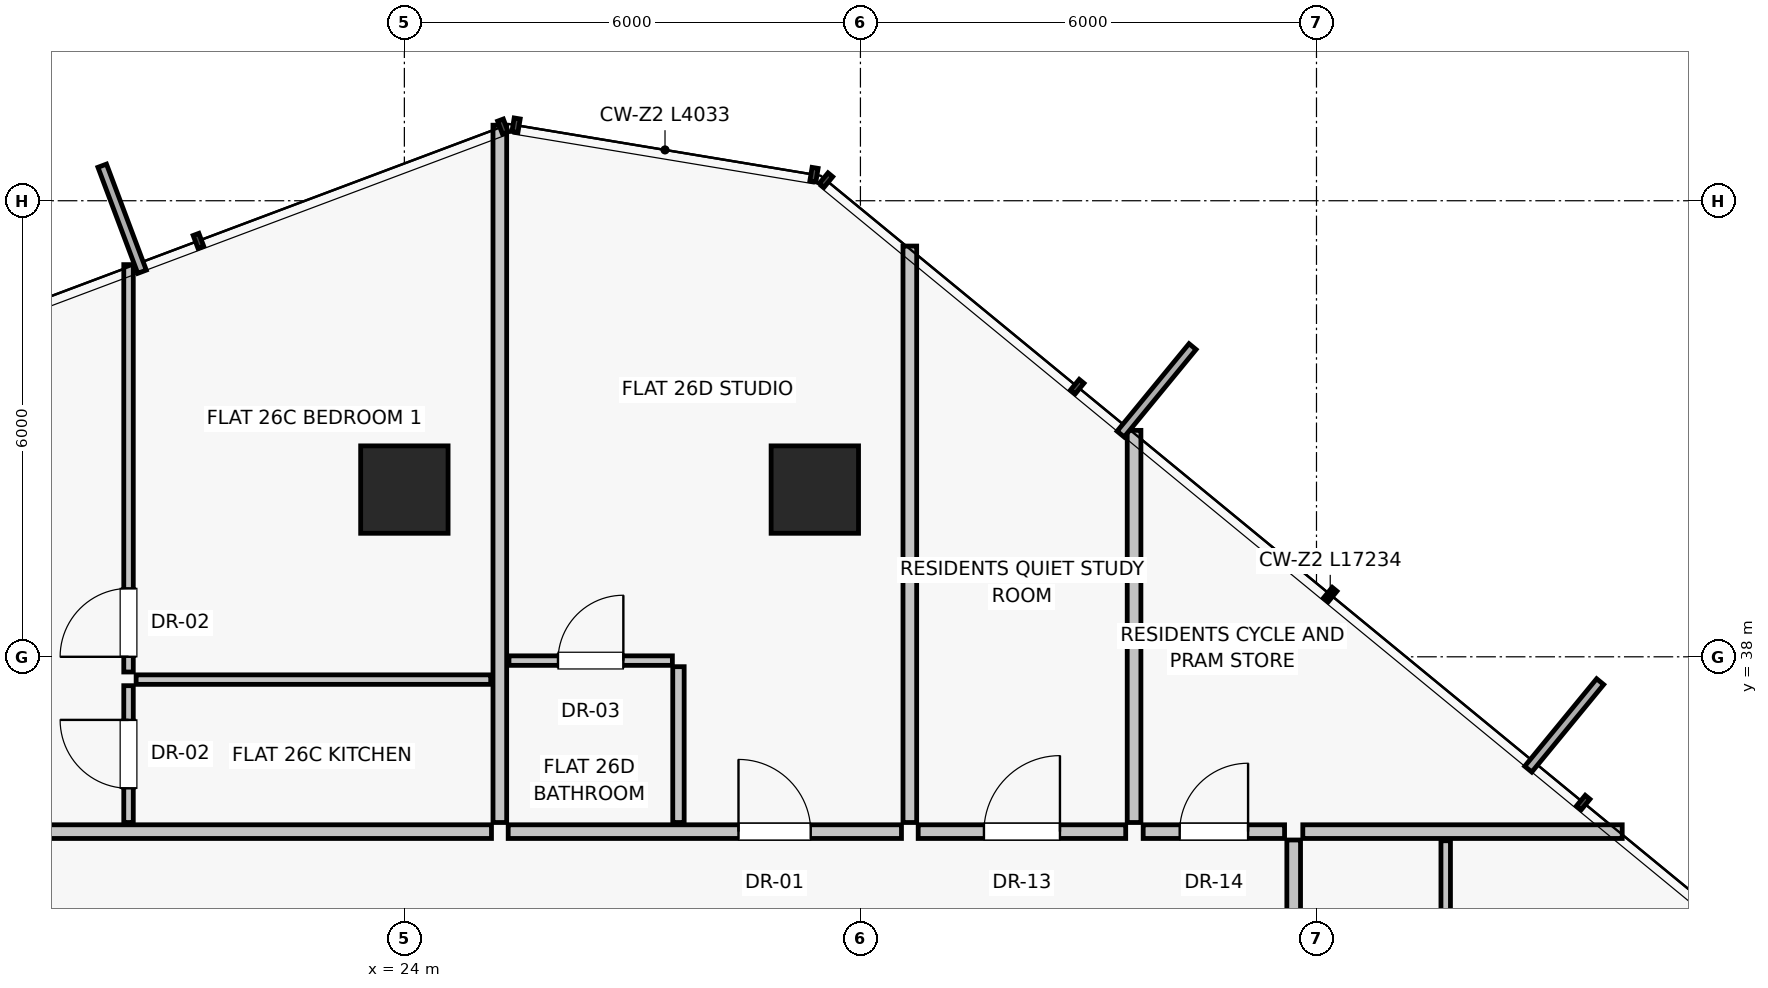
"""IFC4 building model, lengths in metres.
Left out: names, types, materials, properties, quantities, classifications, styles, units other than length and angle.
Written with IfcOpenShell. Run it as: python <this file> out.ifc"""

import sys

from ifc_helpers import new_model, si_unit, direction, frame, frame_2d, origin, origin_2d, place, context, subcontext, project, spatial, rectangle, extrude, source, transform, mapped, element, fill, save


model = new_model("IFC4")
c1 = context("Model", 3, precision=1e-05, world=origin(), true_north=direction((0.0, 1.0)))
c2 = subcontext(c1, "Body", "Model", "MODEL_VIEW")
j1 = project(units=[si_unit("LENGTHUNIT", "METRE"), si_unit("PLANEANGLEUNIT", "RADIAN")], contexts=[c1])
p1 = place(None, origin())
s1 = spatial("IfcSite", under=j1, at=p1, CompositionType="ELEMENT")
p2 = place(p1, origin())
s2 = spatial("IfcBuilding", under=s1, at=p2, CompositionType="ELEMENT")
p3 = place(p2, frame((0.0, 0.0, 95.95)))
s3 = spatial("IfcBuildingStorey", under=s2, at=p3, CompositionType="ELEMENT", Elevation=95.95)
for number, where, z_axis, x_axis in (
    (1, (29.4, 40.2, 0.0), (0.0, 0.0, 1.0), (1.0, 0.0, 0.0)),
    (2, (24.0, 40.2, 0.0), (0.0, 0.0, 1.0), (1.0, 0.0, 0.0)),
):
    element("IfcColumn", number, at=place(p3, frame(where, z_axis=z_axis, x_axis=x_axis)), inside=s3, PredefinedType="COLUMN", context=c2, shape_type="SweptSolid", body=[
        extrude(rectangle(XDim=1.15, YDim=1.15, at=origin_2d()), origin(), (0.0, 0.0, 1.0), 3.25),
    ])
p4 = place(p3, frame((33.6, 35.82, 0.0), z_axis=(0.0, 0.0, 1.0), x_axis=(0.0, 1.0, 0.0)))
e3 = element("IfcWall", 3, at=p4, inside=s3, PredefinedType="PARTITIONING", context=c2, shape_type="SweptSolid", body=[
    extrude(rectangle(XDim=5.159, YDim=0.18, at=frame_2d((2.58, 0.0))), origin(), (0.0, 0.0, 1.0), 3.0),
])
p5 = place(p3, frame((14.51, 35.7, 0.0), z_axis=(0.0, 0.0, 1.0), x_axis=(1.0, 0.0, 0.0)))
e4 = element("IfcWall", 4, at=p5, inside=s3, PredefinedType="PARTITIONING", context=c2, shape_type="SweptSolid", body=[
    extrude(rectangle(XDim=10.636, YDim=0.18, at=frame_2d((5.318, 0.0))), origin(), (0.0, 0.0, 1.0), 2.58),
])
p6 = place(p5, frame((3.525, 0.0, 0.0)))
e5 = element("IfcOpeningElement", 5, at=p6, cuts=e4, PredefinedType="OPENING", context=c2, shape_type="SweptSolid", body=[
    extrude(rectangle(XDim=0.95, YDim=2.02, at=frame_2d((0.475, 1.01))), frame((0.0, 0.1, 0.0), z_axis=(0.0, -1.0, 0.0), x_axis=(1.0, 0.0, 0.0)), (0.0, 0.0, 1.0), 0.2),
])
p7 = place(p3, frame((20.371, 35.82, 0.0), z_axis=(0.0, 0.0, 1.0), x_axis=(0.0, 1.0, 0.0)))
e6 = element("IfcWall", 6, at=p7, inside=s3, PredefinedType="PARTITIONING", context=c2, shape_type="SweptSolid", body=[
    extrude(rectangle(XDim=1.8, YDim=0.125, at=frame_2d((0.9, 0.0))), origin(), (0.0, 0.0, 1.0), 3.0),
])
p8 = place(p7, frame((0.45, 0.0, 0.0)))
e7 = element("IfcOpeningElement", 7, at=p8, cuts=e6, PredefinedType="OPENING", context=c2, shape_type="SweptSolid", body=[
    extrude(rectangle(XDim=0.9, YDim=2.01, at=frame_2d((0.45, 1.005))), frame((0.0, 0.073, 0.0), z_axis=(0.0, -1.0, 0.0), x_axis=(1.0, 0.0, 0.0)), (0.0, 0.0, 1.0), 0.145),
])
p9 = place(p3, frame((20.471, 37.7, 0.0), z_axis=(0.0, 0.0, 1.0), x_axis=(1.0, 0.0, 0.0)))
e8 = element("IfcWall", 8, at=p9, inside=s3, PredefinedType="PARTITIONING", context=c2, shape_type="SweptSolid", body=[
    extrude(rectangle(XDim=4.665, YDim=0.125, at=frame_2d((2.333, 0.0))), origin(), (0.0, 0.0, 1.0), 3.0),
])
p10 = place(p3, frame((20.371, 37.8, 0.0), z_axis=(0.0, 0.0, 1.0), x_axis=(0.0, 1.0, 0.0)))
e9 = element("IfcWall", 9, at=p10, inside=s3, PredefinedType="PARTITIONING", context=c2, shape_type="SweptSolid", body=[
    extrude(rectangle(XDim=5.359, YDim=0.125, at=frame_2d((2.68, 0.0))), origin(), (0.0, 0.0, 1.0), 3.0),
])
p11 = place(p10, frame((0.2, 0.0, 0.0)))
e10 = element("IfcOpeningElement", 10, at=p11, cuts=e9, PredefinedType="OPENING", context=c2, shape_type="SweptSolid", body=[
    extrude(rectangle(XDim=0.9, YDim=2.01, at=frame_2d((0.45, 1.005))), frame((0.0, 0.073, 0.0), z_axis=(0.0, -1.0, 0.0), x_axis=(1.0, 0.0, 0.0)), (0.0, 0.0, 1.0), 0.145),
])
p12 = place(p3, frame((25.256, 35.82, 0.0), z_axis=(0.0, 0.0, 1.0), x_axis=(0.0, 1.0, 0.0)))
e11 = element("IfcWall", 11, at=p12, inside=s3, PredefinedType="PARTITIONING", context=c2, shape_type="SweptSolid", body=[
    extrude(rectangle(XDim=9.174, YDim=0.18, at=frame_2d((4.587, 0.0))), origin(), (0.0, 0.0, 1.0), 3.0),
])
p13 = place(p3, frame((30.76, 35.7, 0.0), z_axis=(0.0, 0.0, 1.0), x_axis=(1.0, 0.0, 0.0)))
e12 = element("IfcWall", 12, at=p13, inside=s3, PredefinedType="PARTITIONING", context=c2, shape_type="SweptSolid", body=[
    extrude(rectangle(XDim=2.73, YDim=0.18, at=frame_2d((1.365, 0.0))), origin(), (0.0, 0.0, 1.0), 3.0),
])
p14 = place(p13, frame((0.865, 0.0, 0.0)))
e13 = element("IfcOpeningElement", 13, at=p14, cuts=e12, PredefinedType="OPENING", context=c2, shape_type="SweptSolid", body=[
    extrude(rectangle(XDim=1.0, YDim=2.01, at=frame_2d((0.5, 1.005))), frame((0.0, 0.1, 0.0), z_axis=(0.0, -1.0, 0.0), x_axis=(1.0, 0.0, 0.0)), (0.0, 0.0, 1.0), 0.2),
])
p15 = place(p3, frame((30.65, 35.82, 0.0), z_axis=(0.0, 0.0, 1.0), x_axis=(0.0, 1.0, 0.0)))
e14 = element("IfcWall", 14, at=p15, inside=s3, PredefinedType="PARTITIONING", context=c2, shape_type="SweptSolid", body=[
    extrude(rectangle(XDim=7.584, YDim=0.18, at=frame_2d((3.792, 0.0))), origin(), (0.0, 0.0, 1.0), 3.0),
])
p16 = place(p3, frame((25.366, 35.7, 0.0), z_axis=(0.0, 0.0, 1.0), x_axis=(1.0, 0.0, 0.0)))
e15 = element("IfcWall", 15, at=p16, inside=s3, PredefinedType="PARTITIONING", context=c2, shape_type="SweptSolid", body=[
    extrude(rectangle(XDim=5.174, YDim=0.18, at=frame_2d((2.587, 0.0))), origin(), (0.0, 0.0, 1.0), 2.58),
])
p17 = place(p16, frame((3.03, 0.0, 0.0)))
e16 = element("IfcOpeningElement", 16, at=p17, cuts=e15, PredefinedType="OPENING", context=c2, shape_type="SweptSolid", body=[
    extrude(rectangle(XDim=0.95, YDim=2.02, at=frame_2d((0.475, 1.01))), frame((0.0, 0.1, 0.0), z_axis=(0.0, -1.0, 0.0), x_axis=(1.0, 0.0, 0.0)), (0.0, 0.0, 1.0), 0.2),
])
p18 = place(p3, frame((27.606, 35.82, 0.0), z_axis=(0.0, 0.0, 1.0), x_axis=(0.0, 1.0, 0.0)))
e17 = element("IfcWall", 17, at=p18, inside=s3, PredefinedType="PARTITIONING", context=c2, shape_type="SweptSolid", body=[
    extrude(rectangle(XDim=2.05, YDim=0.15, at=frame_2d((1.025, 0.0))), origin(), (0.0, 0.0, 1.0), 3.0),
])
p19 = place(p3, frame((25.376, 37.95, 0.0), z_axis=(0.0, 0.0, 1.0), x_axis=(1.0, 0.0, 0.0)))
e18 = element("IfcWall", 18, at=p19, inside=s3, PredefinedType="PARTITIONING", context=c2, shape_type="SweptSolid", body=[
    extrude(rectangle(XDim=2.15, YDim=0.125, at=frame_2d((1.075, 0.0))), origin(), (0.0, 0.0, 1.0), 3.0),
])
p20 = place(p19, frame((0.645, 0.0, 0.0)))
e19 = element("IfcOpeningElement", 19, at=p20, cuts=e18, PredefinedType="OPENING", context=c2, shape_type="SweptSolid", body=[
    extrude(rectangle(XDim=0.86, YDim=2.01, at=frame_2d((0.43, 1.005))), frame((0.0, 0.073, 0.0), z_axis=(0.0, -1.0, 0.0), x_axis=(1.0, 0.0, 0.0)), (0.0, 0.0, 1.0), 0.145),
])
p21 = place(p3, frame((35.82, 35.7, 0.0), z_axis=(0.0, 0.0, 1.0), x_axis=(1.0, 0.0, 0.0)))
e20 = element("IfcWall", 20, at=p21, inside=s3, PredefinedType="PARTITIONING", context=c2, shape_type="SweptSolid", body=[
    extrude(rectangle(XDim=4.202, YDim=0.18, at=frame_2d((2.101, 0.0))), origin(), (0.0, 0.0, 1.0), 3.0),
])
p22 = place(p3, frame((35.7, 18.71, 0.0), z_axis=(0.0, 0.0, 1.0), x_axis=(0.0, 1.0, 0.0)))
e21 = element("IfcWall", 21, at=p22, inside=s3, PredefinedType="PARTITIONING", context=c2, shape_type="SweptSolid", body=[
    extrude(rectangle(XDim=16.88, YDim=0.18, at=frame_2d((8.44, 0.0))), origin(), (0.0, 0.0, 1.0), 2.58),
])
p23 = place(p22, frame((5.94, 0.0, 0.0)))
e22 = element("IfcOpeningElement", 22, at=p23, cuts=e21, PredefinedType="OPENING", context=c2, shape_type="SweptSolid", body=[
    extrude(rectangle(XDim=0.95, YDim=2.02, at=frame_2d((0.475, 1.01))), frame((0.0, 0.1, 0.0), z_axis=(0.0, -1.0, 0.0), x_axis=(1.0, 0.0, 0.0)), (0.0, 0.0, 1.0), 0.2),
])
p24 = place(p3, frame((37.7, 29.5, 0.0), z_axis=(0.0, 0.0, 1.0), x_axis=(0.0, 1.0, 0.0)))
e23 = element("IfcWall", 23, at=p24, inside=s3, PredefinedType="PARTITIONING", context=c2, shape_type="SweptSolid", body=[
    extrude(rectangle(XDim=6.08, YDim=0.125, at=frame_2d((3.04, 0.0))), origin(), (0.0, 0.0, 1.0), 3.0),
])
p25 = place(p3, frame((33.72, 35.7, 0.0), z_axis=(0.0, 0.0, 1.0), x_axis=(1.0, 0.0, 0.0)))
e24 = element("IfcWall", 24, at=p25, inside=s3, PredefinedType="PARTITIONING", context=c2, shape_type="SweptSolid", body=[
    extrude(rectangle(XDim=1.86, YDim=0.18, at=frame_2d((0.93, 0.0))), origin(), (0.0, 0.0, 1.0), 3.0),
])
p26 = place(p25, frame((0.48, 0.0, 0.0)))
e25 = element("IfcOpeningElement", 25, at=p26, cuts=e24, PredefinedType="OPENING", context=c2, shape_type="SweptSolid", body=[
    extrude(rectangle(XDim=0.9, YDim=2.01, at=frame_2d((0.45, 1.005))), frame((0.0, 0.1, 0.0), z_axis=(0.0, -1.0, 0.0), x_axis=(1.0, 0.0, 0.0)), (0.0, 0.0, 1.0), 0.2),
])
m1 = source(origin(), c2, "Body", "SweptSolid", [
    extrude(rectangle(XDim=0.9, YDim=2.01, at=frame_2d((0.45, 1.005))), frame((0.0, 0.025, 0.0), z_axis=(0.0, -1.0, 0.0), x_axis=(1.0, 0.0, 0.0)), (0.0, 0.0, 1.0), 0.05),
])
p27 = place(p8, origin())
e26 = element("IfcDoor", 26, at=p27, inside=s3, OperationType="SINGLE_SWING_RIGHT", PredefinedType="DOOR", context=c2, shape_type="MappedRepresentation", body=[
    mapped(m1, transform((0.0, 0.0, 0.0), scale=1.0)),
])
fill(e7, e26)
p28 = place(p11, origin())
e27 = element("IfcDoor", 27, at=p28, inside=s3, OperationType="SINGLE_SWING_LEFT", PredefinedType="DOOR", context=c2, shape_type="MappedRepresentation", body=[
    mapped(m1, transform((0.0, 0.0, 0.0), scale=1.0)),
])
fill(e10, e27)
m2 = source(origin(), c2, "Body", "SweptSolid", [
    extrude(rectangle(XDim=1.0, YDim=2.01, at=frame_2d((0.5, 1.005))), frame((0.0, 0.025, 0.0), z_axis=(0.0, -1.0, 0.0), x_axis=(1.0, 0.0, 0.0)), (0.0, 0.0, 1.0), 0.05),
])
p29 = place(p14, origin())
e28 = element("IfcDoor", 28, at=p29, inside=s3, OperationType="SINGLE_SWING_RIGHT", PredefinedType="DOOR", context=c2, shape_type="MappedRepresentation", body=[
    mapped(m2, transform((0.0, 0.0, 0.0), scale=1.0)),
])
fill(e13, e28)
m3 = source(origin(), c2, "Body", "SweptSolid", [
    extrude(rectangle(XDim=0.95, YDim=2.02, at=frame_2d((0.475, 1.01))), frame((0.0, 0.025, 0.0), z_axis=(0.0, -1.0, 0.0), x_axis=(1.0, 0.0, 0.0)), (0.0, 0.0, 1.0), 0.05),
])
p30 = place(p17, origin())
e29 = element("IfcDoor", 29, at=p30, inside=s3, OperationType="SINGLE_SWING_LEFT", PredefinedType="DOOR", context=c2, shape_type="MappedRepresentation", body=[
    mapped(m3, transform((0.0, 0.0, 0.0), scale=1.0)),
])
fill(e16, e29)
m4 = source(origin(), c2, "Body", "SweptSolid", [
    extrude(rectangle(XDim=0.86, YDim=2.01, at=frame_2d((0.43, 1.005))), frame((0.0, 0.025, 0.0), z_axis=(0.0, -1.0, 0.0), x_axis=(1.0, 0.0, 0.0)), (0.0, 0.0, 1.0), 0.05),
])
p31 = place(p20, origin())
e30 = element("IfcDoor", 30, at=p31, inside=s3, OperationType="SINGLE_SWING_RIGHT", PredefinedType="DOOR", context=c2, shape_type="MappedRepresentation", body=[
    mapped(m4, transform((0.0, 0.0, 0.0), scale=1.0)),
])
fill(e19, e30)
p32 = place(p26, origin())
e31 = element("IfcDoor", 31, at=p32, inside=s3, OperationType="SINGLE_SWING_RIGHT", PredefinedType="DOOR", context=c2, shape_type="MappedRepresentation", body=[
    mapped(m1, transform((0.0, 0.0, 0.0), scale=1.0)),
])
fill(e25, e31)
save(model, sys.argv[1])
